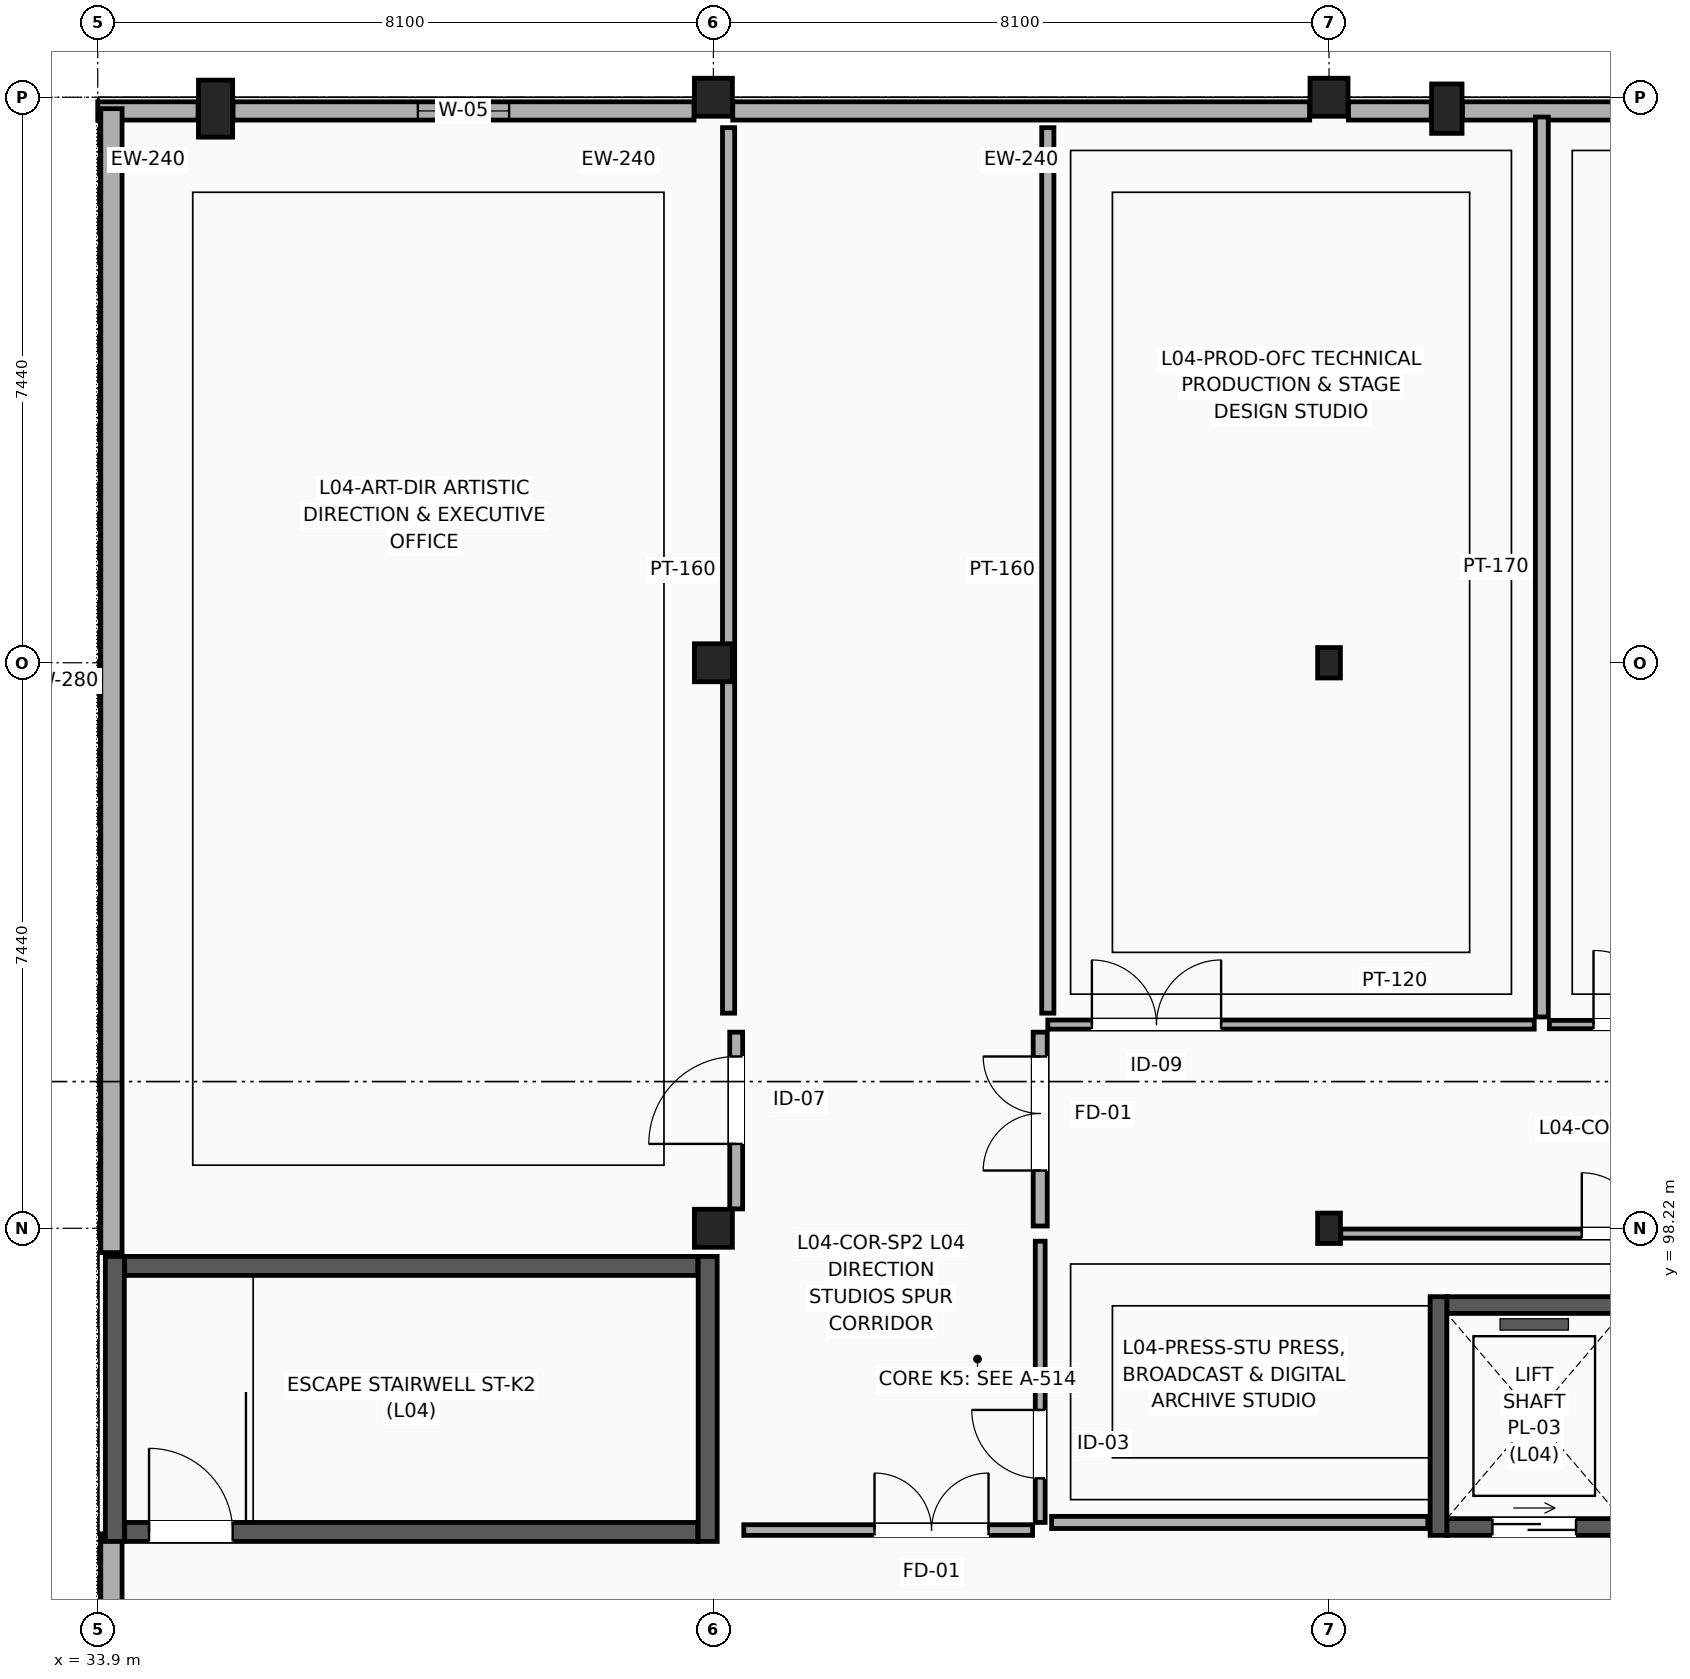
"""IFC4 building model, lengths in metres.
Left out: names, types, materials, properties, quantities, classifications, styles, units other than length and angle.
Written with IfcOpenShell. Run it as: python <this file> out.ifc"""

import sys

from ifc_helpers import new_model, si_unit, direction, frame, frame_2d, origin, origin_2d, place, context, subcontext, project, spatial, rectangle, i_section, extrude, element, fill, save


model = new_model("IFC4")
c1 = context("Model", 3, precision=1e-05, world=origin(), true_north=direction((0.0, 1.0)))
c2 = subcontext(c1, "Body", "Model", "MODEL_VIEW")
j1 = project(units=[si_unit("LENGTHUNIT", "METRE"), si_unit("PLANEANGLEUNIT", "RADIAN")], contexts=[c1])
p1 = place(None, origin())
s1 = spatial("IfcSite", under=j1, at=p1, CompositionType="ELEMENT")
p2 = place(p1, origin())
s2 = spatial("IfcBuilding", under=s1, at=p2, CompositionType="ELEMENT")
p3 = place(p2, frame((0.0, 0.0, 19.2)))
s3 = spatial("IfcBuildingStorey", under=s2, at=p3, CompositionType="ELEMENT", Elevation=19.2)
p4 = place(p3, frame((35.45, 112.95, 0.0), z_axis=(0.0, 0.0, 1.0), x_axis=(1.0, 0.0, 0.0)))
e1 = element("IfcColumn", 1, at=p4, inside=s3, PredefinedType="PILASTER", context=c2, shape_type="SweptSolid", body=[
    extrude(rectangle(XDim=0.45, YDim=0.75, at=origin_2d()), origin(), (0.0, 0.0, 1.0), 4.2),
])
p5 = place(p3, frame((51.65, 112.95, 0.0), z_axis=(0.0, 0.0, 1.0), x_axis=(1.0, 0.0, 0.0)))
e2 = element("IfcColumn", 2, at=p5, inside=s3, PredefinedType="PILASTER", context=c2, shape_type="SweptSolid", body=[
    extrude(rectangle(XDim=0.4, YDim=0.65, at=origin_2d()), origin(), (0.0, 0.0, 1.0), 4.2),
])
for number, where, z_axis, x_axis in (
    (3, (42.0, 98.22, 0.0), (0.0, 0.0, 1.0), (1.0, 0.0, 0.0)),
    (4, (42.0, 105.66, 0.0), (0.0, 0.0, 1.0), (1.0, 0.0, 0.0)),
    (5, (42.0, 113.1, 0.0), (0.0, 0.0, 1.0), (1.0, 0.0, 0.0)),
):
    element("IfcColumn", number, at=place(p3, frame(where, z_axis=z_axis, x_axis=x_axis)), inside=s3, PredefinedType="COLUMN", context=c2, shape_type="SweptSolid", body=[
        extrude(rectangle(XDim=0.5, YDim=0.5, at=origin_2d()), origin(), (0.0, 0.0, 1.0), 4.2),
    ])
for number, where, z_axis, x_axis in (
    (6, (50.1, 98.22, 0.0), (0.0, 0.0, 1.0), (1.0, 0.0, 0.0)),
    (7, (50.1, 105.66, 0.0), (0.0, 0.0, 1.0), (1.0, 0.0, 0.0)),
):
    element("IfcColumn", number, at=place(p3, frame(where, z_axis=z_axis, x_axis=x_axis)), inside=s3, PredefinedType="COLUMN", context=c2, shape_type="SweptSolid", body=[
        extrude(i_section(OverallWidth=0.3, OverallDepth=0.4, WebThickness=0.013, FlangeThickness=0.024, FilletRadius=0.027, at=origin_2d()), origin(), (0.0, 0.0, 1.0), 4.2),
    ])
p6 = place(p3, frame((50.1, 113.1, 0.0), z_axis=(0.0, 0.0, 1.0), x_axis=(1.0, 0.0, 0.0)))
e8 = element("IfcColumn", 8, at=p6, inside=s3, PredefinedType="COLUMN", context=c2, shape_type="SweptSolid", body=[
    extrude(rectangle(XDim=0.5, YDim=0.5, at=origin_2d()), origin(), (0.0, 0.0, 1.0), 4.2),
])
p7 = place(p3, frame((35.68, 112.92, 0.0), z_axis=(0.0, 0.0, 1.0), x_axis=(1.0, 0.0, 0.0)))
e9 = element("IfcWall", 9, at=p7, inside=s3, PredefinedType="SOLIDWALL", context=c2, shape_type="SweptSolid", body=[
    extrude(rectangle(XDim=6.065, YDim=0.24, at=frame_2d((3.033, 0.0))), origin(), (0.0, 0.0, 1.0), 3.945),
])
p8 = place(p7, frame((2.432, 0.0, 0.9)))
e10 = element("IfcOpeningElement", 10, at=p8, cuts=e9, PredefinedType="OPENING", context=c2, shape_type="SweptSolid", body=[
    extrude(rectangle(XDim=1.2, YDim=1.8, at=frame_2d((0.6, 0.9))), frame((0.0, 0.13, 0.0), z_axis=(0.0, -1.0, 0.0), x_axis=(1.0, 0.0, 0.0)), (0.0, 0.0, 1.0), 0.26),
])
p9 = place(p3, frame((33.9, 112.92, 0.0), z_axis=(0.0, 0.0, 1.0), x_axis=(1.0, 0.0, 0.0)))
e11 = element("IfcWall", 11, at=p9, inside=s3, PredefinedType="SOLIDWALL", context=c2, shape_type="SweptSolid", body=[
    extrude(rectangle(XDim=1.32, YDim=0.24, at=frame_2d((0.66, 0.0))), origin(), (0.0, 0.0, 1.0), 3.945),
])
p10 = place(p3, frame((42.255, 112.92, 0.0), z_axis=(0.0, 0.0, 1.0), x_axis=(1.0, 0.0, 0.0)))
e12 = element("IfcWall", 12, at=p10, inside=s3, PredefinedType="SOLIDWALL", context=c2, shape_type="SweptSolid", body=[
    extrude(rectangle(XDim=7.59, YDim=0.24, at=frame_2d((3.795, 0.0))), origin(), (0.0, 0.0, 1.0), 3.097),
])
p11 = place(p3, frame((51.855, 112.92, 0.0), z_axis=(0.0, 0.0, 1.0), x_axis=(1.0, 0.0, 0.0)))
e13 = element("IfcWall", 13, at=p11, inside=s3, PredefinedType="SOLIDWALL", context=c2, shape_type="SweptSolid", body=[
    extrude(rectangle(XDim=6.09, YDim=0.24, at=frame_2d((3.045, 0.0))), origin(), (0.0, 0.0, 1.0), 3.097),
])
p12 = place(p3, frame((50.355, 112.92, 0.0), z_axis=(0.0, 0.0, 1.0), x_axis=(1.0, 0.0, 0.0)))
e14 = element("IfcWall", 14, at=p12, inside=s3, PredefinedType="SOLIDWALL", context=c2, shape_type="SweptSolid", body=[
    extrude(rectangle(XDim=1.09, YDim=0.24, at=frame_2d((0.545, 0.0))), origin(), (0.0, 0.0, 1.0), 3.097),
])
p13 = place(p3, frame((34.08, 88.6, 0.0), z_axis=(0.0, 0.0, 1.0), x_axis=(0.0, 1.0, 0.0)))
e15 = element("IfcWall", 15, at=p13, inside=s3, PredefinedType="SOLIDWALL", context=c2, shape_type="SweptSolid", body=[
    extrude(rectangle(XDim=5.6, YDim=0.28, at=frame_2d((2.8, 0.0))), origin(), (0.0, 0.0, 1.0), 3.945),
])
p14 = place(p3, frame((34.08, 97.9, 0.0), z_axis=(0.0, 0.0, 1.0), x_axis=(0.0, 1.0, 0.0)))
e16 = element("IfcWall", 16, at=p14, inside=s3, PredefinedType="SOLIDWALL", context=c2, shape_type="SweptSolid", body=[
    extrude(rectangle(XDim=15.05, YDim=0.28, at=frame_2d((7.525, 0.0))), origin(), (0.0, 0.0, 1.0), 3.945),
])
p15 = place(p3, frame((34.255, 94.225, 0.0), z_axis=(0.0, 0.0, 1.0), x_axis=(1.0, 0.0, 0.0)))
e17 = element("IfcWall", 17, at=p15, inside=s3, PredefinedType="SHEAR", context=c2, shape_type="SweptSolid", body=[
    extrude(rectangle(XDim=7.54, YDim=0.25, at=frame_2d((3.77, 0.0))), origin(), (0.0, 0.0, 1.0), 3.965),
])
p16 = place(p15, frame((0.32, 0.0, 0.0)))
e18 = element("IfcOpeningElement", 18, at=p16, cuts=e17, PredefinedType="OPENING", context=c2, shape_type="SweptSolid", body=[
    extrude(rectangle(XDim=1.1, YDim=2.2, at=frame_2d((0.55, 1.1))), frame((0.0, 0.135, 0.0), z_axis=(0.0, -1.0, 0.0), x_axis=(1.0, 0.0, 0.0)), (0.0, 0.0, 1.0), 0.27),
])
p17 = place(p3, frame((34.255, 97.725, 0.0), z_axis=(0.0, 0.0, 1.0), x_axis=(1.0, 0.0, 0.0)))
e19 = element("IfcWall", 19, at=p17, inside=s3, PredefinedType="SHEAR", context=c2, shape_type="SweptSolid", body=[
    extrude(rectangle(XDim=7.54, YDim=0.25, at=frame_2d((3.77, 0.0))), origin(), (0.0, 0.0, 1.0), 3.965),
])
for number, where, z_axis, x_axis in (
    (20, (34.125, 94.1, 0.0), (0.0, 0.0, 1.0), (0.0, 1.0, 0.0)),
    (21, (41.925, 94.1, 0.0), (0.0, 0.0, 1.0), (0.0, 1.0, 0.0)),
):
    element("IfcWall", number, at=place(p3, frame(where, z_axis=z_axis, x_axis=x_axis)), inside=s3, PredefinedType="SHEAR", context=c2, shape_type="SweptSolid", body=[
        extrude(rectangle(XDim=3.75, YDim=0.25, at=frame_2d((1.875, 0.0))), origin(), (0.0, 0.0, 1.0), 3.965),
    ])
p18 = place(p3, frame((51.65, 94.29, 0.0), z_axis=(0.0, 0.0, 1.0), x_axis=(1.0, 0.0, 0.0)))
e22 = element("IfcWall", 22, at=p18, inside=s3, PredefinedType="SOLIDWALL", context=c2, shape_type="SweptSolid", body=[
    extrude(rectangle(XDim=2.3, YDim=0.22, at=frame_2d((1.15, 0.0))), origin(), (0.0, 0.0, 1.0), 3.965),
])
p19 = place(p18, frame((0.6, 0.0, 0.0)))
e23 = element("IfcOpeningElement", 23, at=p19, cuts=e22, PredefinedType="OPENING", context=c2, shape_type="SweptSolid", body=[
    extrude(rectangle(XDim=1.1, YDim=2.2, at=frame_2d((0.55, 1.1))), frame((0.0, 0.12, 0.0), z_axis=(0.0, -1.0, 0.0), x_axis=(1.0, 0.0, 0.0)), (0.0, 0.0, 1.0), 0.24),
])
p20 = place(p3, frame((51.65, 97.21, 0.0), z_axis=(0.0, 0.0, 1.0), x_axis=(1.0, 0.0, 0.0)))
e24 = element("IfcWall", 24, at=p20, inside=s3, PredefinedType="SOLIDWALL", context=c2, shape_type="SweptSolid", body=[
    extrude(rectangle(XDim=2.3, YDim=0.22, at=frame_2d((1.15, 0.0))), origin(), (0.0, 0.0, 1.0), 3.965),
])
p21 = place(p3, frame((51.54, 94.18, 0.0), z_axis=(0.0, 0.0, 1.0), x_axis=(0.0, 1.0, 0.0)))
e25 = element("IfcWall", 25, at=p21, inside=s3, PredefinedType="SOLIDWALL", context=c2, shape_type="SweptSolid", body=[
    extrude(rectangle(XDim=3.14, YDim=0.22, at=frame_2d((1.57, 0.0))), origin(), (0.0, 0.0, 1.0), 3.965),
])
p22 = place(p3, frame((42.4, 94.25, 0.0), z_axis=(0.0, 0.0, 1.0), x_axis=(1.0, 0.0, 0.0)))
e26 = element("IfcWall", 26, at=p22, inside=s3, PredefinedType="PARTITIONING", context=c2, shape_type="SweptSolid", body=[
    extrude(rectangle(XDim=3.8, YDim=0.14, at=frame_2d((1.9, 0.0))), origin(), (0.0, 0.0, 1.0), 3.677),
])
p23 = place(p22, frame((1.72, 0.0, 0.0)))
e27 = element("IfcOpeningElement", 27, at=p23, cuts=e26, PredefinedType="OPENING", context=c2, shape_type="SweptSolid", body=[
    extrude(rectangle(XDim=1.5, YDim=2.2, at=frame_2d((0.75, 1.1))), frame((0.0, 0.08, 0.0), z_axis=(0.0, -1.0, 0.0), x_axis=(1.0, 0.0, 0.0)), (0.0, 0.0, 1.0), 0.16),
])
p24 = place(p3, frame((46.3, 94.35, 0.0), z_axis=(0.0, 0.0, 1.0), x_axis=(0.0, 1.0, 0.0)))
e28 = element("IfcWall", 28, at=p24, inside=s3, PredefinedType="PARTITIONING", context=c2, shape_type="SweptSolid", body=[
    extrude(rectangle(XDim=3.7, YDim=0.13, at=frame_2d((1.85, 0.0))), origin(), (0.0, 0.0, 1.0), 3.945),
])
p25 = place(p24, frame((0.58, 0.0, 0.0)))
e29 = element("IfcOpeningElement", 29, at=p25, cuts=e28, PredefinedType="OPENING", context=c2, shape_type="SweptSolid", body=[
    extrude(rectangle(XDim=0.9, YDim=2.1, at=frame_2d((0.45, 1.05))), frame((0.0, 0.075, 0.0), z_axis=(0.0, -1.0, 0.0), x_axis=(1.0, 0.0, 0.0)), (0.0, 0.0, 1.0), 0.15),
])
p26 = place(p3, frame((50.255, 98.15, 0.0), z_axis=(0.0, 0.0, 1.0), x_axis=(1.0, 0.0, 0.0)))
e30 = element("IfcWall", 30, at=p26, inside=s3, PredefinedType="PARTITIONING", context=c2, shape_type="SweptSolid", body=[
    extrude(rectangle(XDim=7.145, YDim=0.12, at=frame_2d((3.573, 0.0))), origin(), (0.0, 0.0, 1.0), 3.147),
])
p27 = place(p26, frame((3.171, 0.0, 0.0)))
e31 = element("IfcOpeningElement", 31, at=p27, cuts=e30, PredefinedType="OPENING", context=c2, shape_type="SweptSolid", body=[
    extrude(rectangle(XDim=1.6, YDim=2.3, at=frame_2d((0.8, 1.15))), frame((0.0, 0.07, 0.0), z_axis=(0.0, -1.0, 0.0), x_axis=(1.0, 0.0, 0.0)), (0.0, 0.0, 1.0), 0.14),
])
p28 = place(p3, frame((46.3, 98.25, 0.0), z_axis=(0.0, 0.0, 1.0), x_axis=(0.0, 1.0, 0.0)))
e32 = element("IfcWall", 32, at=p28, inside=s3, PredefinedType="PARTITIONING", context=c2, shape_type="SweptSolid", body=[
    extrude(rectangle(XDim=2.55, YDim=0.185, at=frame_2d((1.275, 0.0))), origin(), (0.0, 0.0, 1.0), 3.447),
])
p29 = place(p28, frame((0.73, 0.0, 0.0)))
e33 = element("IfcOpeningElement", 33, at=p29, cuts=e32, PredefinedType="OPENING", context=c2, shape_type="SweptSolid", body=[
    extrude(rectangle(XDim=1.5, YDim=2.2, at=frame_2d((0.75, 1.1))), frame((0.0, 0.103, 0.0), z_axis=(0.0, -1.0, 0.0), x_axis=(1.0, 0.0, 0.0)), (0.0, 0.0, 1.0), 0.205),
])
p30 = place(p3, frame((42.3, 98.475, 0.0), z_axis=(0.0, 0.0, 1.0), x_axis=(0.0, 1.0, 0.0)))
e34 = element("IfcWall", 34, at=p30, inside=s3, PredefinedType="PARTITIONING", context=c2, shape_type="SweptSolid", body=[
    extrude(rectangle(XDim=2.325, YDim=0.17, at=frame_2d((1.163, 0.0))), origin(), (0.0, 0.0, 1.0), 3.945),
])
p31 = place(p30, frame((0.855, 0.0, 0.0)))
e35 = element("IfcOpeningElement", 35, at=p31, cuts=e34, PredefinedType="OPENING", context=c2, shape_type="SweptSolid", body=[
    extrude(rectangle(XDim=1.15, YDim=2.25, at=frame_2d((0.575, 1.125))), frame((0.0, 0.095, 0.0), z_axis=(0.0, -1.0, 0.0), x_axis=(1.0, 0.0, 0.0)), (0.0, 0.0, 1.0), 0.19),
])
p32 = place(p3, frame((46.4, 100.9, 0.0), z_axis=(0.0, 0.0, 1.0), x_axis=(1.0, 0.0, 0.0)))
e36 = element("IfcWall", 36, at=p32, inside=s3, PredefinedType="PARTITIONING", context=c2, shape_type="SweptSolid", body=[
    extrude(rectangle(XDim=6.4, YDim=0.12, at=frame_2d((3.2, 0.0))), origin(), (0.0, 0.0, 1.0), 3.617),
])
p33 = place(p32, frame((0.58, 0.0, 0.0)))
e37 = element("IfcOpeningElement", 37, at=p33, cuts=e36, PredefinedType="OPENING", context=c2, shape_type="SweptSolid", body=[
    extrude(rectangle(XDim=1.7, YDim=2.35, at=frame_2d((0.85, 1.175))), frame((0.0, 0.07, 0.0), z_axis=(0.0, -1.0, 0.0), x_axis=(1.0, 0.0, 0.0)), (0.0, 0.0, 1.0), 0.14),
])
p34 = place(p3, frame((53.0, 100.9, 0.0), z_axis=(0.0, 0.0, 1.0), x_axis=(1.0, 0.0, 0.0)))
e38 = element("IfcWall", 38, at=p34, inside=s3, PredefinedType="PARTITIONING", context=c2, shape_type="SweptSolid", body=[
    extrude(rectangle(XDim=5.2, YDim=0.11, at=frame_2d((2.6, 0.0))), origin(), (0.0, 0.0, 1.0), 3.587),
])
p35 = place(p34, frame((0.58, 0.0, 0.0)))
e39 = element("IfcOpeningElement", 39, at=p35, cuts=e38, PredefinedType="OPENING", context=c2, shape_type="SweptSolid", body=[
    extrude(rectangle(XDim=1.95, YDim=2.45, at=frame_2d((0.975, 1.225))), frame((0.0, 0.065, 0.0), z_axis=(0.0, -1.0, 0.0), x_axis=(1.0, 0.0, 0.0)), (0.0, 0.0, 1.0), 0.13),
])
p36 = place(p3, frame((52.9, 101.0, 0.0), z_axis=(0.0, 0.0, 1.0), x_axis=(0.0, 1.0, 0.0)))
e40 = element("IfcWall", 40, at=p36, inside=s3, PredefinedType="PARTITIONING", context=c2, shape_type="SweptSolid", body=[
    extrude(rectangle(XDim=11.84, YDim=0.17, at=frame_2d((5.92, 0.0))), origin(), (0.0, 0.0, 1.0), 3.147),
])
p37 = place(p3, frame((46.45, 94.35, 0.0), z_axis=(0.0, 0.0, 1.0), x_axis=(1.0, 0.0, 0.0)))
e41 = element("IfcWall", 41, at=p37, inside=s3, PredefinedType="PARTITIONING", context=c2, shape_type="SweptSolid", body=[
    extrude(rectangle(XDim=4.95, YDim=0.16, at=frame_2d((2.475, 0.0))), origin(), (0.0, 0.0, 1.0), 3.297),
])
p38 = place(p3, frame((42.2, 101.05, 0.0), z_axis=(0.0, 0.0, 1.0), x_axis=(0.0, 1.0, 0.0)))
e42 = element("IfcWall", 42, at=p38, inside=s3, PredefinedType="PARTITIONING", context=c2, shape_type="SweptSolid", body=[
    extrude(rectangle(XDim=11.65, YDim=0.16, at=frame_2d((5.825, 0.0))), origin(), (0.0, 0.0, 1.0), 3.297),
])
p39 = place(p3, frame((46.4, 101.05, 0.0), z_axis=(0.0, 0.0, 1.0), x_axis=(0.0, 1.0, 0.0)))
e43 = element("IfcWall", 43, at=p39, inside=s3, PredefinedType="PARTITIONING", context=c2, shape_type="SweptSolid", body=[
    extrude(rectangle(XDim=11.65, YDim=0.16, at=frame_2d((5.825, 0.0))), origin(), (0.0, 0.0, 1.0), 3.447),
])
p40 = place(p8, origin())
e44 = element("IfcWindow", 44, at=p40, inside=s3, PartitioningType="SINGLE_PANEL", PredefinedType="WINDOW", context=c2, shape_type="SweptSolid", body=[
    extrude(rectangle(XDim=1.2, YDim=1.8, at=frame_2d((0.6, 0.9))), frame((0.0, 0.03, 0.0), z_axis=(0.0, -1.0, 0.0), x_axis=(1.0, 0.0, 0.0)), (0.0, 0.0, 1.0), 0.06),
])
fill(e10, e44)
p41 = place(p16, origin())
e45 = element("IfcDoor", 45, at=p41, inside=s3, OperationType="SINGLE_SWING_LEFT", PredefinedType="DOOR", context=c2, shape_type="SweptSolid", body=[
    extrude(rectangle(XDim=1.1, YDim=2.2, at=frame_2d((0.55, 1.1))), frame((0.0, 0.025, 0.0), z_axis=(0.0, -1.0, 0.0), x_axis=(1.0, 0.0, 0.0)), (0.0, 0.0, 1.0), 0.05),
])
fill(e18, e45)
p42 = place(p19, origin())
e46 = element("IfcDoor", 46, at=p42, inside=s3, OperationType="SLIDING_TO_LEFT", PredefinedType="DOOR", context=c2, shape_type="SweptSolid", body=[
    extrude(rectangle(XDim=1.1, YDim=2.2, at=frame_2d((0.55, 1.1))), frame((0.0, 0.025, 0.0), z_axis=(0.0, -1.0, 0.0), x_axis=(1.0, 0.0, 0.0)), (0.0, 0.0, 1.0), 0.05),
])
fill(e23, e46)
p43 = place(p23, origin())
e47 = element("IfcDoor", 47, at=p43, inside=s3, OperationType="DOUBLE_DOOR_SINGLE_SWING", PredefinedType="DOOR", context=c2, shape_type="SweptSolid", body=[
    extrude(rectangle(XDim=1.5, YDim=2.2, at=frame_2d((0.75, 1.1))), frame((0.0, 0.025, 0.0), z_axis=(0.0, -1.0, 0.0), x_axis=(1.0, 0.0, 0.0)), (0.0, 0.0, 1.0), 0.05),
])
fill(e27, e47)
p44 = place(p25, origin())
e48 = element("IfcDoor", 48, at=p44, inside=s3, OperationType="SINGLE_SWING_RIGHT", PredefinedType="DOOR", context=c2, shape_type="SweptSolid", body=[
    extrude(rectangle(XDim=0.9, YDim=2.1, at=frame_2d((0.45, 1.05))), frame((0.0, 0.025, 0.0), z_axis=(0.0, -1.0, 0.0), x_axis=(1.0, 0.0, 0.0)), (0.0, 0.0, 1.0), 0.05),
])
fill(e29, e48)
p45 = place(p27, origin())
e49 = element("IfcDoor", 49, at=p45, inside=s3, OperationType="DOUBLE_DOOR_SINGLE_SWING", PredefinedType="DOOR", context=c2, shape_type="SweptSolid", body=[
    extrude(rectangle(XDim=1.6, YDim=2.3, at=frame_2d((0.8, 1.15))), frame((0.0, 0.025, 0.0), z_axis=(0.0, -1.0, 0.0), x_axis=(1.0, 0.0, 0.0)), (0.0, 0.0, 1.0), 0.05),
])
fill(e31, e49)
p46 = place(p29, origin())
e50 = element("IfcDoor", 50, at=p46, inside=s3, OperationType="DOUBLE_DOOR_SINGLE_SWING", PredefinedType="DOOR", context=c2, shape_type="SweptSolid", body=[
    extrude(rectangle(XDim=1.5, YDim=2.2, at=frame_2d((0.75, 1.1))), frame((0.0, 0.025, 0.0), z_axis=(0.0, -1.0, 0.0), x_axis=(1.0, 0.0, 0.0)), (0.0, 0.0, 1.0), 0.05),
])
fill(e33, e50)
p47 = place(p31, origin())
e51 = element("IfcDoor", 51, at=p47, inside=s3, OperationType="SINGLE_SWING_LEFT", PredefinedType="DOOR", context=c2, shape_type="SweptSolid", body=[
    extrude(rectangle(XDim=1.15, YDim=2.25, at=frame_2d((0.575, 1.125))), frame((0.0, 0.025, 0.0), z_axis=(0.0, -1.0, 0.0), x_axis=(1.0, 0.0, 0.0)), (0.0, 0.0, 1.0), 0.05),
])
fill(e35, e51)
p48 = place(p33, origin())
e52 = element("IfcDoor", 52, at=p48, inside=s3, OperationType="DOUBLE_DOOR_SINGLE_SWING", PredefinedType="DOOR", context=c2, shape_type="SweptSolid", body=[
    extrude(rectangle(XDim=1.7, YDim=2.35, at=frame_2d((0.85, 1.175))), frame((0.0, 0.025, 0.0), z_axis=(0.0, -1.0, 0.0), x_axis=(1.0, 0.0, 0.0)), (0.0, 0.0, 1.0), 0.05),
])
fill(e37, e52)
p49 = place(p35, origin())
e53 = element("IfcDoor", 53, at=p49, inside=s3, OperationType="DOUBLE_DOOR_SINGLE_SWING", PredefinedType="DOOR", context=c2, shape_type="SweptSolid", body=[
    extrude(rectangle(XDim=1.95, YDim=2.45, at=frame_2d((0.975, 1.225))), frame((0.0, 0.025, 0.0), z_axis=(0.0, -1.0, 0.0), x_axis=(1.0, 0.0, 0.0)), (0.0, 0.0, 1.0), 0.05),
])
fill(e39, e53)
save(model, sys.argv[1])
